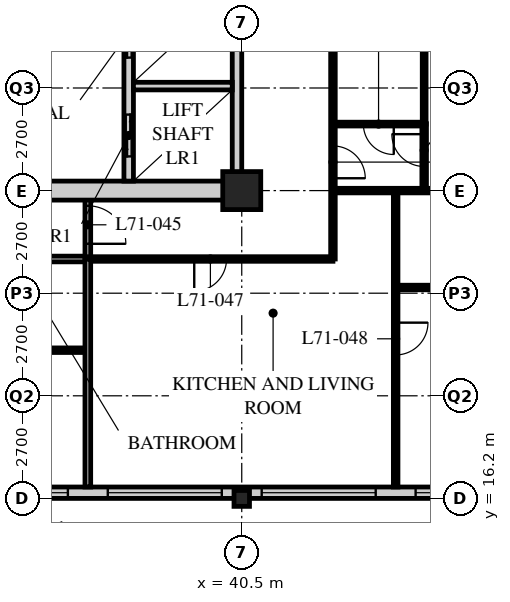
"""IFC4 building model, lengths in metres.
Left out: names, types, materials, properties, quantities, classifications, styles, units other than length and angle.
Written with IfcOpenShell. Run it as: python <this file> out.ifc"""

import sys

from ifc_helpers import new_model, si_unit, direction, frame, frame_2d, origin, origin_2d, place, context, subcontext, project, spatial, rectangle, hollow_rectangle, i_section, extrude, element, fill, save


model = new_model("IFC4")
c1 = context("Model", 3, precision=1e-05, world=origin(), true_north=direction((0.0, 1.0)))
c2 = subcontext(c1, "Body", "Model", "MODEL_VIEW")
j1 = project(units=[si_unit("LENGTHUNIT", "METRE"), si_unit("PLANEANGLEUNIT", "RADIAN")], contexts=[c1])
p1 = place(None, origin())
s1 = spatial("IfcSite", under=j1, at=p1, CompositionType="ELEMENT")
p2 = place(p1, origin())
s2 = spatial("IfcBuilding", under=s1, at=p2, CompositionType="ELEMENT")
p3 = place(p2, frame((0.0, 0.0, 277.5)))
s3 = spatial("IfcBuildingStorey", under=s2, at=p3, CompositionType="ELEMENT", Elevation=277.5)
p4 = place(p3, frame((40.5, 16.2, 0.0), z_axis=(0.0, 0.0, 1.0), x_axis=(1.0, 0.0, 0.0)))
e1 = element("IfcColumn", 1, at=p4, inside=s3, PredefinedType="COLUMN", context=c2, shape_type="SweptSolid", body=[
    extrude(i_section(OverallWidth=0.407, OverallDepth=0.419, WebThickness=0.031, FlangeThickness=0.049, FilletRadius=0.015, at=origin_2d()), origin(), (0.0, 0.0, 1.0), 3.9),
])
p5 = place(p3, frame((40.5, 24.3, 0.0), z_axis=(0.0, 0.0, 1.0), x_axis=(1.0, 0.0, 0.0)))
e2 = element("IfcColumn", 2, at=p5, inside=s3, PredefinedType="COLUMN", context=c2, shape_type="SweptSolid", body=[
    extrude(hollow_rectangle(XDim=1.0, YDim=1.0, WallThickness=0.1, at=origin_2d()), origin(), (0.0, 0.0, 1.0), 3.9),
])
p6 = place(p3, frame((8.4, 16.35, 0.0), z_axis=(0.0, 0.0, 1.0), x_axis=(1.0, 0.0, 0.0)))
e3 = element("IfcWall", 3, at=p6, inside=s3, PredefinedType="SOLIDWALL", context=c2, shape_type="SweptSolid", body=[
    extrude(rectangle(XDim=40.2, YDim=0.3, at=frame_2d((20.1, 0.0))), origin(), (0.0, 0.0, 1.0), 3.69),
])
p7 = place(p6, frame((0.225, 0.0, 0.6)))
e4 = element("IfcOpeningElement", 4, at=p7, cuts=e3, PredefinedType="OPENING", context=c2, shape_type="SweptSolid", body=[
    extrude(rectangle(XDim=3.0, YDim=2.4, at=frame_2d((1.5, 1.2))), frame((0.0, 0.16, 0.0), z_axis=(0.0, -1.0, 0.0), x_axis=(1.0, 0.0, 0.0)), (0.0, 0.0, 1.0), 0.32),
])
p8 = place(p6, frame((4.275, 0.0, 0.6)))
e5 = element("IfcOpeningElement", 5, at=p8, cuts=e3, PredefinedType="OPENING", context=c2, shape_type="SweptSolid", body=[
    extrude(rectangle(XDim=3.0, YDim=2.4, at=frame_2d((1.5, 1.2))), frame((0.0, 0.16, 0.0), z_axis=(0.0, -1.0, 0.0), x_axis=(1.0, 0.0, 0.0)), (0.0, 0.0, 1.0), 0.32),
])
p9 = place(p6, frame((8.325, 0.0, 0.6)))
e6 = element("IfcOpeningElement", 6, at=p9, cuts=e3, PredefinedType="OPENING", context=c2, shape_type="SweptSolid", body=[
    extrude(rectangle(XDim=3.0, YDim=2.4, at=frame_2d((1.5, 1.2))), frame((0.0, 0.16, 0.0), z_axis=(0.0, -1.0, 0.0), x_axis=(1.0, 0.0, 0.0)), (0.0, 0.0, 1.0), 0.32),
])
p10 = place(p6, frame((12.375, 0.0, 0.6)))
e7 = element("IfcOpeningElement", 7, at=p10, cuts=e3, PredefinedType="OPENING", context=c2, shape_type="SweptSolid", body=[
    extrude(rectangle(XDim=3.0, YDim=2.4, at=frame_2d((1.5, 1.2))), frame((0.0, 0.16, 0.0), z_axis=(0.0, -1.0, 0.0), x_axis=(1.0, 0.0, 0.0)), (0.0, 0.0, 1.0), 0.32),
])
p11 = place(p6, frame((16.425, 0.0, 0.6)))
e8 = element("IfcOpeningElement", 8, at=p11, cuts=e3, PredefinedType="OPENING", context=c2, shape_type="SweptSolid", body=[
    extrude(rectangle(XDim=3.0, YDim=2.4, at=frame_2d((1.5, 1.2))), frame((0.0, 0.16, 0.0), z_axis=(0.0, -1.0, 0.0), x_axis=(1.0, 0.0, 0.0)), (0.0, 0.0, 1.0), 0.32),
])
p12 = place(p6, frame((20.475, 0.0, 0.6)))
e9 = element("IfcOpeningElement", 9, at=p12, cuts=e3, PredefinedType="OPENING", context=c2, shape_type="SweptSolid", body=[
    extrude(rectangle(XDim=3.0, YDim=2.4, at=frame_2d((1.5, 1.2))), frame((0.0, 0.16, 0.0), z_axis=(0.0, -1.0, 0.0), x_axis=(1.0, 0.0, 0.0)), (0.0, 0.0, 1.0), 0.32),
])
p13 = place(p6, frame((24.525, 0.0, 0.6)))
e10 = element("IfcOpeningElement", 10, at=p13, cuts=e3, PredefinedType="OPENING", context=c2, shape_type="SweptSolid", body=[
    extrude(rectangle(XDim=3.0, YDim=2.4, at=frame_2d((1.5, 1.2))), frame((0.0, 0.16, 0.0), z_axis=(0.0, -1.0, 0.0), x_axis=(1.0, 0.0, 0.0)), (0.0, 0.0, 1.0), 0.32),
])
p14 = place(p6, frame((28.575, 0.0, 0.6)))
e11 = element("IfcOpeningElement", 11, at=p14, cuts=e3, PredefinedType="OPENING", context=c2, shape_type="SweptSolid", body=[
    extrude(rectangle(XDim=3.0, YDim=2.4, at=frame_2d((1.5, 1.2))), frame((0.0, 0.16, 0.0), z_axis=(0.0, -1.0, 0.0), x_axis=(1.0, 0.0, 0.0)), (0.0, 0.0, 1.0), 0.32),
])
p15 = place(p6, frame((32.625, 0.0, 0.6)))
e12 = element("IfcOpeningElement", 12, at=p15, cuts=e3, PredefinedType="OPENING", context=c2, shape_type="SweptSolid", body=[
    extrude(rectangle(XDim=3.0, YDim=2.4, at=frame_2d((1.5, 1.2))), frame((0.0, 0.16, 0.0), z_axis=(0.0, -1.0, 0.0), x_axis=(1.0, 0.0, 0.0)), (0.0, 0.0, 1.0), 0.32),
])
p16 = place(p6, frame((36.675, 0.0, 0.6)))
e13 = element("IfcOpeningElement", 13, at=p16, cuts=e3, PredefinedType="OPENING", context=c2, shape_type="SweptSolid", body=[
    extrude(rectangle(XDim=3.0, YDim=2.4, at=frame_2d((1.5, 1.2))), frame((0.0, 0.16, 0.0), z_axis=(0.0, -1.0, 0.0), x_axis=(1.0, 0.0, 0.0)), (0.0, 0.0, 1.0), 0.32),
])
p17 = place(p3, frame((12.15, 22.5, 0.0), z_axis=(0.0, 0.0, 1.0), x_axis=(1.0, 0.0, 0.0)))
e14 = element("IfcWall", 14, at=p17, inside=s3, PredefinedType="PARTITIONING", context=c2, shape_type="SweptSolid", body=[
    extrude(rectangle(XDim=24.3, YDim=0.15, at=frame_2d((12.15, 0.0))), origin(), (0.0, 0.0, 1.0), 3.69),
])
p18 = place(p17, frame((4.45, 0.0, 0.0)))
e15 = element("IfcOpeningElement", 15, at=p18, cuts=e14, PredefinedType="OPENING", context=c2, shape_type="SweptSolid", body=[
    extrude(rectangle(XDim=1.0, YDim=2.1, at=frame_2d((0.5, 1.05))), frame((0.0, 0.085, 0.0), z_axis=(0.0, -1.0, 0.0), x_axis=(1.0, 0.0, 0.0)), (0.0, 0.0, 1.0), 0.17),
])
p19 = place(p17, frame((12.55, 0.0, 0.0)))
e16 = element("IfcOpeningElement", 16, at=p19, cuts=e14, PredefinedType="OPENING", context=c2, shape_type="SweptSolid", body=[
    extrude(rectangle(XDim=1.0, YDim=2.1, at=frame_2d((0.5, 1.05))), frame((0.0, 0.085, 0.0), z_axis=(0.0, -1.0, 0.0), x_axis=(1.0, 0.0, 0.0)), (0.0, 0.0, 1.0), 0.17),
])
p20 = place(p17, frame((2.625, 0.0, 0.0)))
e17 = element("IfcOpeningElement", 17, at=p20, cuts=e14, PredefinedType="OPENING", context=c2, shape_type="SweptSolid", body=[
    extrude(rectangle(XDim=1.0, YDim=2.1, at=frame_2d((0.5, 1.05))), frame((0.0, 0.085, 0.0), z_axis=(0.0, -1.0, 0.0), x_axis=(1.0, 0.0, 0.0)), (0.0, 0.0, 1.0), 0.17),
])
p21 = place(p3, frame((36.45, 22.5, 0.0), z_axis=(0.0, 0.0, 1.0), x_axis=(0.0, 1.0, 0.0)))
e18 = element("IfcWall", 18, at=p21, inside=s3, PredefinedType="PARTITIONING", context=c2, shape_type="SweptSolid", body=[
    extrude(rectangle(XDim=1.8, YDim=0.15, at=frame_2d((0.9, 0.0))), origin(), (0.0, 0.0, 1.0), 3.69),
])
p22 = place(p21, frame((0.4, 0.0, 0.0)))
e19 = element("IfcOpeningElement", 19, at=p22, cuts=e18, PredefinedType="OPENING", context=c2, shape_type="SweptSolid", body=[
    extrude(rectangle(XDim=1.0, YDim=2.1, at=frame_2d((0.5, 1.05))), frame((0.0, 0.085, 0.0), z_axis=(0.0, -1.0, 0.0), x_axis=(1.0, 0.0, 0.0)), (0.0, 0.0, 1.0), 0.17),
])
p23 = place(p3, frame((12.15, 20.1, 0.0), z_axis=(0.0, 0.0, 1.0), x_axis=(1.0, 0.0, 0.0)))
e20 = element("IfcWall", 20, at=p23, inside=s3, PredefinedType="PARTITIONING", context=c2, shape_type="SweptSolid", body=[
    extrude(rectangle(XDim=24.3, YDim=0.12, at=frame_2d((12.15, 0.0))), origin(), (0.0, 0.0, 1.0), 3.69),
])
p24 = place(p23, frame((5.025, 0.0, 0.0)))
e21 = element("IfcOpeningElement", 21, at=p24, cuts=e20, PredefinedType="OPENING", context=c2, shape_type="SweptSolid", body=[
    extrude(rectangle(XDim=0.85, YDim=2.1, at=frame_2d((0.425, 1.05))), frame((0.0, 0.07, 0.0), z_axis=(0.0, -1.0, 0.0), x_axis=(1.0, 0.0, 0.0)), (0.0, 0.0, 1.0), 0.14),
])
p25 = place(p23, frame((8.425, 0.0, 0.0)))
e22 = element("IfcOpeningElement", 22, at=p25, cuts=e20, PredefinedType="OPENING", context=c2, shape_type="SweptSolid", body=[
    extrude(rectangle(XDim=0.85, YDim=2.1, at=frame_2d((0.425, 1.05))), frame((0.0, 0.07, 0.0), z_axis=(0.0, -1.0, 0.0), x_axis=(1.0, 0.0, 0.0)), (0.0, 0.0, 1.0), 0.14),
])
p26 = place(p23, frame((13.125, 0.0, 0.0)))
e23 = element("IfcOpeningElement", 23, at=p26, cuts=e20, PredefinedType="OPENING", context=c2, shape_type="SweptSolid", body=[
    extrude(rectangle(XDim=0.85, YDim=2.1, at=frame_2d((0.425, 1.05))), frame((0.0, 0.07, 0.0), z_axis=(0.0, -1.0, 0.0), x_axis=(1.0, 0.0, 0.0)), (0.0, 0.0, 1.0), 0.14),
])
p27 = place(p23, frame((20.575, 0.0, 0.0)))
e24 = element("IfcOpeningElement", 24, at=p27, cuts=e20, PredefinedType="OPENING", context=c2, shape_type="SweptSolid", body=[
    extrude(rectangle(XDim=0.85, YDim=2.1, at=frame_2d((0.425, 1.05))), frame((0.0, 0.07, 0.0), z_axis=(0.0, -1.0, 0.0), x_axis=(1.0, 0.0, 0.0)), (0.0, 0.0, 1.0), 0.14),
])
p28 = place(p23, frame((2.725, 0.0, 0.0)))
e25 = element("IfcOpeningElement", 25, at=p28, cuts=e20, PredefinedType="OPENING", context=c2, shape_type="SweptSolid", body=[
    extrude(rectangle(XDim=0.85, YDim=2.1, at=frame_2d((0.425, 1.05))), frame((0.0, 0.07, 0.0), z_axis=(0.0, -1.0, 0.0), x_axis=(1.0, 0.0, 0.0)), (0.0, 0.0, 1.0), 0.14),
])
p29 = place(p3, frame((42.9, 22.5, 0.0), z_axis=(0.0, 0.0, 1.0), x_axis=(0.0, 1.0, 0.0)))
e26 = element("IfcWall", 26, at=p29, inside=s3, PredefinedType="PARTITIONING", context=c2, shape_type="SweptSolid", body=[
    extrude(rectangle(XDim=18.0, YDim=0.12, at=frame_2d((9.0, 0.0))), origin(), (0.0, 0.0, 1.0), 3.69),
])
p30 = place(p29, frame((2.125, 0.0, 0.0)))
e27 = element("IfcOpeningElement", 27, at=p30, cuts=e26, PredefinedType="OPENING", context=c2, shape_type="SweptSolid", body=[
    extrude(rectangle(XDim=0.85, YDim=2.1, at=frame_2d((0.425, 1.05))), frame((0.0, 0.07, 0.0), z_axis=(0.0, -1.0, 0.0), x_axis=(1.0, 0.0, 0.0)), (0.0, 0.0, 1.0), 0.14),
])
p31 = place(p29, frame((6.175, 0.0, 0.0)))
e28 = element("IfcOpeningElement", 28, at=p31, cuts=e26, PredefinedType="OPENING", context=c2, shape_type="SweptSolid", body=[
    extrude(rectangle(XDim=0.85, YDim=2.1, at=frame_2d((0.425, 1.05))), frame((0.0, 0.07, 0.0), z_axis=(0.0, -1.0, 0.0), x_axis=(1.0, 0.0, 0.0)), (0.0, 0.0, 1.0), 0.14),
])
p32 = place(p29, frame((10.225, 0.0, 0.0)))
e29 = element("IfcOpeningElement", 29, at=p32, cuts=e26, PredefinedType="OPENING", context=c2, shape_type="SweptSolid", body=[
    extrude(rectangle(XDim=0.85, YDim=2.1, at=frame_2d((0.425, 1.05))), frame((0.0, 0.07, 0.0), z_axis=(0.0, -1.0, 0.0), x_axis=(1.0, 0.0, 0.0)), (0.0, 0.0, 1.0), 0.14),
])
p33 = place(p29, frame((14.275, 0.0, 0.0)))
e30 = element("IfcOpeningElement", 30, at=p33, cuts=e26, PredefinedType="OPENING", context=c2, shape_type="SweptSolid", body=[
    extrude(rectangle(XDim=0.85, YDim=2.1, at=frame_2d((0.425, 1.05))), frame((0.0, 0.07, 0.0), z_axis=(0.0, -1.0, 0.0), x_axis=(1.0, 0.0, 0.0)), (0.0, 0.0, 1.0), 0.14),
])
p34 = place(p3, frame((36.45, 22.5, 0.0), z_axis=(0.0, 0.0, 1.0), x_axis=(1.0, 0.0, 0.0)))
e31 = element("IfcWall", 31, at=p34, inside=s3, PredefinedType="PARTITIONING", context=c2, shape_type="SweptSolid", body=[
    extrude(rectangle(XDim=6.45, YDim=0.12, at=frame_2d((3.225, 0.0))), origin(), (0.0, 0.0, 1.0), 3.69),
])
p35 = place(p34, frame((2.8, 0.0, 0.0)))
e32 = element("IfcOpeningElement", 32, at=p35, cuts=e31, PredefinedType="OPENING", context=c2, shape_type="SweptSolid", body=[
    extrude(rectangle(XDim=0.85, YDim=2.1, at=frame_2d((0.425, 1.05))), frame((0.0, 0.07, 0.0), z_axis=(0.0, -1.0, 0.0), x_axis=(1.0, 0.0, 0.0)), (0.0, 0.0, 1.0), 0.14),
])
p36 = place(p3, frame((42.9, 24.3, 0.0), z_axis=(0.0, 0.0, 1.0), x_axis=(1.0, 0.0, 0.0)))
e33 = element("IfcWall", 33, at=p36, inside=s3, PredefinedType="PARTITIONING", context=c2, shape_type="SweptSolid", body=[
    extrude(rectangle(XDim=9.45, YDim=0.12, at=frame_2d((4.725, 0.0))), origin(), (0.0, 0.0, 1.0), 3.078),
])
p37 = place(p3, frame((36.45, 16.5, 0.0), z_axis=(0.0, 0.0, 1.0), x_axis=(0.0, 1.0, 0.0)))
e34 = element("IfcWall", 34, at=p37, inside=s3, PredefinedType="PARTITIONING", context=c2, shape_type="SweptSolid", body=[
    extrude(rectangle(XDim=6.0, YDim=0.15, at=frame_2d((3.0, 0.0))), origin(), (0.0, 0.0, 1.0), 3.69),
])
p38 = place(p3, frame((44.55, 16.5, 0.0), z_axis=(0.0, 0.0, 1.0), x_axis=(0.0, 1.0, 0.0)))
e35 = element("IfcWall", 35, at=p38, inside=s3, PredefinedType="PARTITIONING", context=c2, shape_type="SweptSolid", body=[
    extrude(rectangle(XDim=7.8, YDim=0.12, at=frame_2d((3.9, 0.0))), origin(), (0.0, 0.0, 1.0), 3.69),
])
p39 = place(p38, frame((3.475, 0.0, 0.0)))
e36 = element("IfcOpeningElement", 36, at=p39, cuts=e35, PredefinedType="OPENING", context=c2, shape_type="SweptSolid", body=[
    extrude(rectangle(XDim=0.85, YDim=2.1, at=frame_2d((0.425, 1.05))), frame((0.0, 0.07, 0.0), z_axis=(0.0, -1.0, 0.0), x_axis=(1.0, 0.0, 0.0)), (0.0, 0.0, 1.0), 0.14),
])
p40 = place(p3, frame((42.9, 26.05, 0.0), z_axis=(0.0, 0.0, 1.0), x_axis=(1.0, 0.0, 0.0)))
e37 = element("IfcWall", 37, at=p40, inside=s3, PredefinedType="PARTITIONING", context=c2, shape_type="SweptSolid", body=[
    extrude(rectangle(XDim=2.4, YDim=0.1, at=frame_2d((1.2, 0.0))), origin(), (0.0, 0.0, 1.0), 3.69),
])
p41 = place(p40, frame((0.8, 0.0, 0.0)))
e38 = element("IfcOpeningElement", 38, at=p41, cuts=e37, PredefinedType="OPENING", context=c2, shape_type="SweptSolid", body=[
    extrude(rectangle(XDim=0.8, YDim=2.1, at=frame_2d((0.4, 1.05))), frame((0.0, 0.06, 0.0), z_axis=(0.0, -1.0, 0.0), x_axis=(1.0, 0.0, 0.0)), (0.0, 0.0, 1.0), 0.12),
])
p42 = place(p3, frame((45.3, 26.05, 0.0), z_axis=(0.0, 0.0, 1.0), x_axis=(0.0, 1.0, 0.0)))
e39 = element("IfcWall", 39, at=p42, inside=s3, PredefinedType="PARTITIONING", context=c2, shape_type="SweptSolid", body=[
    extrude(rectangle(XDim=2.3, YDim=0.1, at=frame_2d((1.15, 0.0))), origin(), (0.0, 0.0, 1.0), 3.69),
])
p43 = place(p3, frame((45.3, 24.3, 0.0), z_axis=(0.0, 0.0, 1.0), x_axis=(0.0, 1.0, 0.0)))
e40 = element("IfcWall", 40, at=p43, inside=s3, PredefinedType="PARTITIONING", context=c2, shape_type="SweptSolid", body=[
    extrude(rectangle(XDim=1.76, YDim=0.12, at=frame_2d((0.88, 0.0))), origin(), (0.0, 0.0, 1.0), 3.69),
])
p44 = place(p43, frame((0.635, 0.0, 0.0)))
e41 = element("IfcOpeningElement", 41, at=p44, cuts=e40, PredefinedType="OPENING", context=c2, shape_type="SweptSolid", body=[
    extrude(rectangle(XDim=0.85, YDim=2.1, at=frame_2d((0.425, 1.05))), frame((0.0, 0.07, 0.0), z_axis=(0.0, -1.0, 0.0), x_axis=(1.0, 0.0, 0.0)), (0.0, 0.0, 1.0), 0.14),
])
p45 = place(p3, frame((44.55, 21.75, 0.0), z_axis=(0.0, 0.0, 1.0), x_axis=(1.0, 0.0, 0.0)))
e42 = element("IfcWall", 42, at=p45, inside=s3, PredefinedType="PARTITIONING", context=c2, shape_type="SweptSolid", body=[
    extrude(rectangle(XDim=7.8, YDim=0.12, at=frame_2d((3.9, 0.0))), origin(), (0.0, 0.0, 1.0), 3.69),
])
p46 = place(p45, frame((3.475, 0.0, 0.0)))
e43 = element("IfcOpeningElement", 43, at=p46, cuts=e42, PredefinedType="OPENING", context=c2, shape_type="SweptSolid", body=[
    extrude(rectangle(XDim=0.85, YDim=2.1, at=frame_2d((0.425, 1.05))), frame((0.0, 0.07, 0.0), z_axis=(0.0, -1.0, 0.0), x_axis=(1.0, 0.0, 0.0)), (0.0, 0.0, 1.0), 0.14),
])
p47 = place(p3, frame((15.95, 24.3, 0.0), z_axis=(0.0, 0.0, 1.0), x_axis=(1.0, 0.0, 0.0)))
e44 = element("IfcWall", 44, at=p47, inside=s3, PredefinedType="SOLIDWALL", context=c2, shape_type="SweptSolid", body=[
    extrude(rectangle(XDim=24.55, YDim=0.5, at=frame_2d((12.275, 0.0))), origin(), (0.0, 0.0, 1.0), 3.04),
])
p48 = place(p47, frame((11.5, 0.0, 0.0)))
e45 = element("IfcOpeningElement", 45, at=p48, cuts=e44, PredefinedType="OPENING", context=c2, shape_type="SweptSolid", body=[
    extrude(rectangle(XDim=1.8, YDim=2.4, at=frame_2d((0.9, 1.2))), frame((0.0, 0.26, 0.0), z_axis=(0.0, -1.0, 0.0), x_axis=(1.0, 0.0, 0.0)), (0.0, 0.0, 1.0), 0.52),
])
p49 = place(p3, frame((40.375, 24.55, 0.0), z_axis=(0.0, 0.0, 1.0), x_axis=(0.0, 1.0, 0.0)))
e46 = element("IfcWall", 46, at=p49, inside=s3, PredefinedType="SOLIDWALL", context=c2, shape_type="SweptSolid", body=[
    extrude(rectangle(XDim=15.7, YDim=0.25, at=frame_2d((7.85, 0.0))), origin(), (0.0, 0.0, 1.0), 3.078),
])
p50 = place(p3, frame((37.525, 24.55, 0.0), z_axis=(0.0, 0.0, 1.0), x_axis=(0.0, 1.0, 0.0)))
e47 = element("IfcWall", 47, at=p50, inside=s3, PredefinedType="SOLIDWALL", context=c2, shape_type="SweptSolid", body=[
    extrude(rectangle(XDim=7.75, YDim=0.25, at=frame_2d((3.875, 0.0))), origin(), (0.0, 0.0, 1.0), 3.69),
])
p51 = place(p50, frame((0.65, 0.0, 0.0)))
e48 = element("IfcOpeningElement", 48, at=p51, cuts=e47, PredefinedType="OPENING", context=c2, shape_type="SweptSolid", body=[
    extrude(rectangle(XDim=1.1, YDim=2.4, at=frame_2d((0.55, 1.2))), frame((0.0, 0.135, 0.0), z_axis=(0.0, -1.0, 0.0), x_axis=(1.0, 0.0, 0.0)), (0.0, 0.0, 1.0), 0.27),
])
p52 = place(p50, frame((3.25, 0.0, 0.0)))
e49 = element("IfcOpeningElement", 49, at=p52, cuts=e47, PredefinedType="OPENING", context=c2, shape_type="SweptSolid", body=[
    extrude(rectangle(XDim=1.1, YDim=2.4, at=frame_2d((0.55, 1.2))), frame((0.0, 0.135, 0.0), z_axis=(0.0, -1.0, 0.0), x_axis=(1.0, 0.0, 0.0)), (0.0, 0.0, 1.0), 0.27),
])
p53 = place(p50, frame((5.85, 0.0, 0.0)))
e50 = element("IfcOpeningElement", 50, at=p53, cuts=e47, PredefinedType="OPENING", context=c2, shape_type="SweptSolid", body=[
    extrude(rectangle(XDim=1.1, YDim=2.4, at=frame_2d((0.55, 1.2))), frame((0.0, 0.135, 0.0), z_axis=(0.0, -1.0, 0.0), x_axis=(1.0, 0.0, 0.0)), (0.0, 0.0, 1.0), 0.27),
])
p54 = place(p3, frame((37.65, 27.05, 0.0), z_axis=(0.0, 0.0, 1.0), x_axis=(1.0, 0.0, 0.0)))
e51 = element("IfcWall", 51, at=p54, inside=s3, PredefinedType="SOLIDWALL", context=c2, shape_type="SweptSolid", body=[
    extrude(rectangle(XDim=2.6, YDim=0.2, at=frame_2d((1.3, 0.0))), origin(), (0.0, 0.0, 1.0), 3.69),
])
p55 = place(p13, origin())
e52 = element("IfcWindow", 52, at=p55, inside=s3, PartitioningType="SINGLE_PANEL", PredefinedType="WINDOW", context=c2, shape_type="SweptSolid", body=[
    extrude(rectangle(XDim=3.0, YDim=2.4, at=frame_2d((1.5, 1.2))), frame((0.0, 0.03, 0.0), z_axis=(0.0, -1.0, 0.0), x_axis=(1.0, 0.0, 0.0)), (0.0, 0.0, 1.0), 0.06),
])
fill(e10, e52)
p56 = place(p14, origin())
e53 = element("IfcWindow", 53, at=p56, inside=s3, PartitioningType="SINGLE_PANEL", PredefinedType="WINDOW", context=c2, shape_type="SweptSolid", body=[
    extrude(rectangle(XDim=3.0, YDim=2.4, at=frame_2d((1.5, 1.2))), frame((0.0, 0.03, 0.0), z_axis=(0.0, -1.0, 0.0), x_axis=(1.0, 0.0, 0.0)), (0.0, 0.0, 1.0), 0.06),
])
fill(e11, e53)
p57 = place(p15, origin())
e54 = element("IfcWindow", 54, at=p57, inside=s3, PartitioningType="SINGLE_PANEL", PredefinedType="WINDOW", context=c2, shape_type="SweptSolid", body=[
    extrude(rectangle(XDim=3.0, YDim=2.4, at=frame_2d((1.5, 1.2))), frame((0.0, 0.03, 0.0), z_axis=(0.0, -1.0, 0.0), x_axis=(1.0, 0.0, 0.0)), (0.0, 0.0, 1.0), 0.06),
])
fill(e12, e54)
p58 = place(p16, origin())
e55 = element("IfcWindow", 55, at=p58, inside=s3, PartitioningType="SINGLE_PANEL", PredefinedType="WINDOW", context=c2, shape_type="SweptSolid", body=[
    extrude(rectangle(XDim=3.0, YDim=2.4, at=frame_2d((1.5, 1.2))), frame((0.0, 0.03, 0.0), z_axis=(0.0, -1.0, 0.0), x_axis=(1.0, 0.0, 0.0)), (0.0, 0.0, 1.0), 0.06),
])
fill(e13, e55)
p59 = place(p22, origin())
e56 = element("IfcDoor", 56, at=p59, inside=s3, OperationType="SINGLE_SWING_RIGHT", PredefinedType="DOOR", context=c2, shape_type="SweptSolid", body=[
    extrude(rectangle(XDim=1.0, YDim=2.1, at=frame_2d((0.5, 1.05))), frame((0.0, 0.025, 0.0), z_axis=(0.0, -1.0, 0.0), x_axis=(1.0, 0.0, 0.0)), (0.0, 0.0, 1.0), 0.05),
])
fill(e19, e56)
p60 = place(p35, origin())
e57 = element("IfcDoor", 57, at=p60, inside=s3, OperationType="SINGLE_SWING_RIGHT", PredefinedType="DOOR", context=c2, shape_type="SweptSolid", body=[
    extrude(rectangle(XDim=0.85, YDim=2.1, at=frame_2d((0.425, 1.05))), frame((0.0, 0.025, 0.0), z_axis=(0.0, -1.0, 0.0), x_axis=(1.0, 0.0, 0.0)), (0.0, 0.0, 1.0), 0.05),
])
fill(e32, e57)
p61 = place(p39, origin())
e58 = element("IfcDoor", 58, at=p61, inside=s3, OperationType="SINGLE_SWING_LEFT", PredefinedType="DOOR", context=c2, shape_type="SweptSolid", body=[
    extrude(rectangle(XDim=0.85, YDim=2.1, at=frame_2d((0.425, 1.05))), frame((0.0, 0.025, 0.0), z_axis=(0.0, -1.0, 0.0), x_axis=(1.0, 0.0, 0.0)), (0.0, 0.0, 1.0), 0.05),
])
fill(e36, e58)
p62 = place(p41, origin())
e59 = element("IfcDoor", 59, at=p62, inside=s3, OperationType="SINGLE_SWING_LEFT", PredefinedType="DOOR", context=c2, shape_type="SweptSolid", body=[
    extrude(rectangle(XDim=0.8, YDim=2.1, at=frame_2d((0.4, 1.05))), frame((0.0, 0.025, 0.0), z_axis=(0.0, -1.0, 0.0), x_axis=(1.0, 0.0, 0.0)), (0.0, 0.0, 1.0), 0.05),
])
fill(e38, e59)
p63 = place(p30, origin())
e60 = element("IfcDoor", 60, at=p63, inside=s3, OperationType="SINGLE_SWING_RIGHT", PredefinedType="DOOR", context=c2, shape_type="SweptSolid", body=[
    extrude(rectangle(XDim=0.85, YDim=2.1, at=frame_2d((0.425, 1.05))), frame((0.0, 0.025, 0.0), z_axis=(0.0, -1.0, 0.0), x_axis=(1.0, 0.0, 0.0)), (0.0, 0.0, 1.0), 0.05),
])
fill(e27, e60)
p64 = place(p44, origin())
e61 = element("IfcDoor", 61, at=p64, inside=s3, OperationType="SINGLE_SWING_RIGHT", PredefinedType="DOOR", context=c2, shape_type="SweptSolid", body=[
    extrude(rectangle(XDim=0.85, YDim=2.1, at=frame_2d((0.425, 1.05))), frame((0.0, 0.025, 0.0), z_axis=(0.0, -1.0, 0.0), x_axis=(1.0, 0.0, 0.0)), (0.0, 0.0, 1.0), 0.05),
])
fill(e41, e61)
p65 = place(p51, origin())
e62 = element("IfcDoor", 62, at=p65, inside=s3, OperationType="DOUBLE_DOOR_SLIDING", PredefinedType="DOOR", context=c2, shape_type="SweptSolid", body=[
    extrude(rectangle(XDim=1.1, YDim=2.4, at=frame_2d((0.55, 1.2))), frame((0.0, 0.025, 0.0), z_axis=(0.0, -1.0, 0.0), x_axis=(1.0, 0.0, 0.0)), (0.0, 0.0, 1.0), 0.05),
])
fill(e48, e62)
p66 = place(p52, origin())
e63 = element("IfcDoor", 63, at=p66, inside=s3, OperationType="DOUBLE_DOOR_SLIDING", PredefinedType="DOOR", context=c2, shape_type="SweptSolid", body=[
    extrude(rectangle(XDim=1.1, YDim=2.4, at=frame_2d((0.55, 1.2))), frame((0.0, 0.025, 0.0), z_axis=(0.0, -1.0, 0.0), x_axis=(1.0, 0.0, 0.0)), (0.0, 0.0, 1.0), 0.05),
])
fill(e49, e63)
save(model, sys.argv[1])
